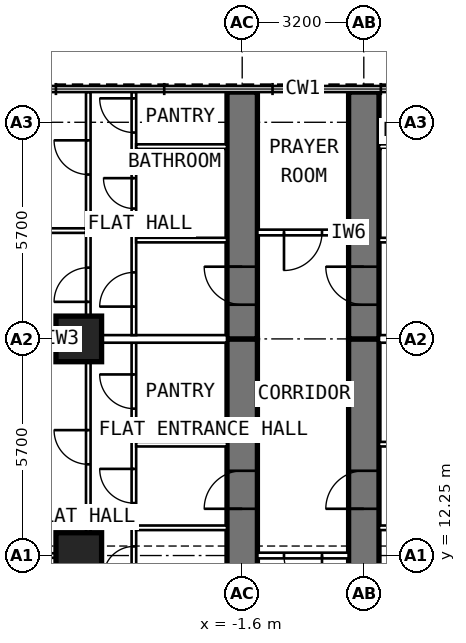
"""IFC4 building model, lengths in metres.
Left out: names, types, materials, properties, quantities, classifications, styles, units other than length and angle.
Written with IfcOpenShell. Run it as: python <this file> out.ifc"""

import sys

from ifc_helpers import new_model, si_unit, direction, frame, frame_2d, origin, origin_2d, place, context, subcontext, project, spatial, rectangle, extrude, element, fill, save


model = new_model("IFC4")
c1 = context("Model", 3, precision=1e-05, world=origin(), true_north=direction((0.0, 1.0)))
c2 = subcontext(c1, "Body", "Model", "MODEL_VIEW")
j1 = project(units=[si_unit("LENGTHUNIT", "METRE"), si_unit("PLANEANGLEUNIT", "RADIAN")], contexts=[c1])
p1 = place(None, origin())
s1 = spatial("IfcSite", under=j1, at=p1, CompositionType="ELEMENT")
p2 = place(p1, origin())
s2 = spatial("IfcBuilding", under=s1, at=p2, CompositionType="ELEMENT")
p3 = place(p2, frame((0.0, 0.0, 176.0)))
s3 = spatial("IfcBuildingStorey", under=s2, at=p3, CompositionType="ELEMENT", Elevation=176.0)
for number, where, z_axis, x_axis in (
    (1, (-5.9, 12.25, 0.0), (0.0, 0.0, 1.0), (0.0, 1.0, 0.0)),
    (2, (-5.9, 17.95, 0.0), (0.0, 0.0, 1.0), (0.0, 1.0, 0.0)),
):
    element("IfcColumn", number, at=place(p3, frame(where, z_axis=z_axis, x_axis=x_axis)), inside=s3, PredefinedType="COLUMN", context=c2, shape_type="SweptSolid", body=[
        extrude(rectangle(XDim=1.2, YDim=1.2, at=origin_2d()), origin(), (0.0, 0.0, 1.0), 3.6),
    ])
p4 = place(p3, frame((-1.6, 9.6, 0.0), z_axis=(0.0, 0.0, 1.0), x_axis=(0.0, 1.0, 0.0)))
e3 = element("IfcWall", 3, at=p4, inside=s3, PredefinedType="SHEAR", context=c2, shape_type="SweptSolid", body=[
    extrude(rectangle(XDim=8.35, YDim=0.8, at=frame_2d((4.175, 0.0))), origin(), (0.0, 0.0, 1.0), 3.6),
])
p5 = place(p4, frame((3.88, 0.0, 0.0)))
e4 = element("IfcOpeningElement", 4, at=p5, cuts=e3, PredefinedType="OPENING", context=c2, shape_type="SweptSolid", body=[
    extrude(rectangle(XDim=1.0, YDim=2.1, at=frame_2d((0.5, 1.05))), frame((0.0, 0.412, 0.0), z_axis=(0.0, -1.0, 0.0), x_axis=(1.0, 0.0, 0.0)), (0.0, 0.0, 1.0), 0.824),
])
p6 = place(p3, frame((-1.6, 17.95, 0.0), z_axis=(0.0, 0.0, 1.0), x_axis=(0.0, 1.0, 0.0)))
e5 = element("IfcWall", 5, at=p6, inside=s3, PredefinedType="SHEAR", context=c2, shape_type="SweptSolid", body=[
    extrude(rectangle(XDim=6.495, YDim=0.8, at=frame_2d((3.248, 0.0))), origin(), (0.0, 0.0, 1.0), 3.6),
])
p7 = place(p6, frame((0.9, 0.0, 0.0)))
e6 = element("IfcOpeningElement", 6, at=p7, cuts=e5, PredefinedType="OPENING", context=c2, shape_type="SweptSolid", body=[
    extrude(rectangle(XDim=1.0, YDim=2.1, at=frame_2d((0.5, 1.05))), frame((0.0, 0.412, 0.0), z_axis=(0.0, -1.0, 0.0), x_axis=(1.0, 0.0, 0.0)), (0.0, 0.0, 1.0), 0.824),
])
p8 = place(p3, frame((1.6, 9.6, 0.0), z_axis=(0.0, 0.0, 1.0), x_axis=(0.0, 1.0, 0.0)))
e7 = element("IfcWall", 7, at=p8, inside=s3, PredefinedType="SHEAR", context=c2, shape_type="SweptSolid", body=[
    extrude(rectangle(XDim=8.35, YDim=0.8, at=frame_2d((4.175, 0.0))), origin(), (0.0, 0.0, 1.0), 3.6),
])
p9 = place(p8, frame((3.88, 0.0, 0.0)))
e8 = element("IfcOpeningElement", 8, at=p9, cuts=e7, PredefinedType="OPENING", context=c2, shape_type="SweptSolid", body=[
    extrude(rectangle(XDim=1.0, YDim=2.1, at=frame_2d((0.5, 1.05))), frame((0.0, 0.412, 0.0), z_axis=(0.0, -1.0, 0.0), x_axis=(1.0, 0.0, 0.0)), (0.0, 0.0, 1.0), 0.824),
])
p10 = place(p3, frame((1.6, 17.95, 0.0), z_axis=(0.0, 0.0, 1.0), x_axis=(0.0, 1.0, 0.0)))
e9 = element("IfcWall", 9, at=p10, inside=s3, PredefinedType="SHEAR", context=c2, shape_type="SweptSolid", body=[
    extrude(rectangle(XDim=6.495, YDim=0.8, at=frame_2d((3.248, 0.0))), origin(), (0.0, 0.0, 1.0), 3.6),
])
p11 = place(p10, frame((0.9, 0.0, 0.0)))
e10 = element("IfcOpeningElement", 10, at=p11, cuts=e9, PredefinedType="OPENING", context=c2, shape_type="SweptSolid", body=[
    extrude(rectangle(XDim=1.0, YDim=2.1, at=frame_2d((0.5, 1.05))), frame((0.0, 0.412, 0.0), z_axis=(0.0, -1.0, 0.0), x_axis=(1.0, 0.0, 0.0)), (0.0, 0.0, 1.0), 0.824),
])
p12 = place(p3, frame((-4.45, 10.05, 0.0), z_axis=(0.0, 0.0, 1.0), x_axis=(0.0, 1.0, 0.0)))
e11 = element("IfcWall", 11, at=p12, inside=s3, PredefinedType="PARTITIONING", context=c2, shape_type="SweptSolid", body=[
    extrude(rectangle(XDim=7.8, YDim=0.12, at=frame_2d((3.9, 0.0))), origin(), (0.0, 0.0, 1.0), 3.35),
])
p13 = place(p12, frame((1.64, 0.0, 0.0)))
e12 = element("IfcOpeningElement", 12, at=p13, cuts=e11, PredefinedType="OPENING", context=c2, shape_type="SweptSolid", body=[
    extrude(rectangle(XDim=0.8, YDim=2.1, at=frame_2d((0.4, 1.05))), frame((0.0, 0.072, 0.0), z_axis=(0.0, -1.0, 0.0), x_axis=(1.0, 0.0, 0.0)), (0.0, 0.0, 1.0), 0.144),
])
p14 = place(p12, frame((3.58, 0.0, 0.0)))
e13 = element("IfcOpeningElement", 13, at=p14, cuts=e11, PredefinedType="OPENING", context=c2, shape_type="SweptSolid", body=[
    extrude(rectangle(XDim=0.9, YDim=2.1, at=frame_2d((0.45, 1.05))), frame((0.0, 0.072, 0.0), z_axis=(0.0, -1.0, 0.0), x_axis=(1.0, 0.0, 0.0)), (0.0, 0.0, 1.0), 0.144),
])
p15 = place(p12, frame((6.065, 0.0, 0.0)))
e14 = element("IfcOpeningElement", 14, at=p15, cuts=e11, PredefinedType="OPENING", context=c2, shape_type="SweptSolid", body=[
    extrude(rectangle(XDim=0.9, YDim=2.1, at=frame_2d((0.45, 1.05))), frame((0.0, 0.072, 0.0), z_axis=(0.0, -1.0, 0.0), x_axis=(1.0, 0.0, 0.0)), (0.0, 0.0, 1.0), 0.144),
])
p16 = place(p3, frame((-5.65, 9.6, 0.0), z_axis=(0.0, 0.0, 1.0), x_axis=(0.0, 1.0, 0.0)))
e15 = element("IfcWall", 15, at=p16, inside=s3, PredefinedType="PARTITIONING", context=c2, shape_type="SweptSolid", body=[
    extrude(rectangle(XDim=8.1, YDim=0.12, at=frame_2d((4.05, 0.0))), origin(), (0.0, 0.0, 1.0), 3.35),
])
p17 = place(p16, frame((5.05, 0.0, 0.0)))
e16 = element("IfcOpeningElement", 16, at=p17, cuts=e15, PredefinedType="OPENING", context=c2, shape_type="SweptSolid", body=[
    extrude(rectangle(XDim=0.9, YDim=2.1, at=frame_2d((0.45, 1.05))), frame((0.0, 0.072, 0.0), z_axis=(0.0, -1.0, 0.0), x_axis=(1.0, 0.0, 0.0)), (0.0, 0.0, 1.0), 0.144),
])
p18 = place(p3, frame((-5.71, 12.25, 0.0), z_axis=(0.0, 0.0, 1.0), x_axis=(-1.0, 0.0, 0.0)))
e17 = element("IfcWall", 17, at=p18, inside=s3, PredefinedType="PARTITIONING", context=c2, shape_type="SweptSolid", body=[
    extrude(rectangle(XDim=4.99, YDim=0.12, at=frame_2d((2.495, 0.0))), origin(), (0.0, 0.0, 1.0), 2.45),
])
p19 = place(p18, frame((1.94, 0.0, 0.0)))
e18 = element("IfcOpeningElement", 18, at=p19, cuts=e17, PredefinedType="OPENING", context=c2, shape_type="SweptSolid", body=[
    extrude(rectangle(XDim=0.9, YDim=2.1, at=frame_2d((0.45, 1.05))), frame((0.0, 0.072, 0.0), z_axis=(0.0, -1.0, 0.0), x_axis=(1.0, 0.0, 0.0)), (0.0, 0.0, 1.0), 0.144),
])
for number, where, z_axis, x_axis in (
    (19, (-2.0, 12.98, 0.0), (0.0, 0.0, 1.0), (-1.0, 0.0, 0.0)),
    (20, (-2.0, 15.18, 0.0), (0.0, 0.0, 1.0), (-1.0, 0.0, 0.0)),
):
    element("IfcWall", number, at=place(p3, frame(where, z_axis=z_axis, x_axis=x_axis)), inside=s3, PredefinedType="PARTITIONING", context=c2, shape_type="SweptSolid", body=[
        extrude(rectangle(XDim=2.39, YDim=0.12, at=frame_2d((1.195, 0.0))), origin(), (0.0, 0.0, 1.0), 3.35),
    ])
p20 = place(p3, frame((-4.45, 18.05, 0.0), z_axis=(0.0, 0.0, 1.0), x_axis=(0.0, 1.0, 0.0)))
e21 = element("IfcWall", 21, at=p20, inside=s3, PredefinedType="PARTITIONING", context=c2, shape_type="SweptSolid", body=[
    extrude(rectangle(XDim=6.395, YDim=0.12, at=frame_2d((3.198, 0.0))), origin(), (0.0, 0.0, 1.0), 3.35),
])
p21 = place(p20, frame((0.75, 0.0, 0.0)))
e22 = element("IfcOpeningElement", 22, at=p21, cuts=e21, PredefinedType="OPENING", context=c2, shape_type="SweptSolid", body=[
    extrude(rectangle(XDim=0.9, YDim=2.1, at=frame_2d((0.45, 1.05))), frame((0.0, 0.072, 0.0), z_axis=(0.0, -1.0, 0.0), x_axis=(1.0, 0.0, 0.0)), (0.0, 0.0, 1.0), 0.144),
])
p22 = place(p20, frame((3.33, 0.0, 0.0)))
e23 = element("IfcOpeningElement", 23, at=p22, cuts=e21, PredefinedType="OPENING", context=c2, shape_type="SweptSolid", body=[
    extrude(rectangle(XDim=0.8, YDim=2.1, at=frame_2d((0.4, 1.05))), frame((0.0, 0.072, 0.0), z_axis=(0.0, -1.0, 0.0), x_axis=(1.0, 0.0, 0.0)), (0.0, 0.0, 1.0), 0.144),
])
p23 = place(p20, frame((5.33, 0.0, 0.0)))
e24 = element("IfcOpeningElement", 24, at=p23, cuts=e21, PredefinedType="OPENING", context=c2, shape_type="SweptSolid", body=[
    extrude(rectangle(XDim=0.9, YDim=2.1, at=frame_2d((0.45, 1.05))), frame((0.0, 0.072, 0.0), z_axis=(0.0, -1.0, 0.0), x_axis=(1.0, 0.0, 0.0)), (0.0, 0.0, 1.0), 0.144),
])
p24 = place(p3, frame((-5.65, 18.05, 0.0), z_axis=(0.0, 0.0, 1.0), x_axis=(0.0, 1.0, 0.0)))
e25 = element("IfcWall", 25, at=p24, inside=s3, PredefinedType="PARTITIONING", context=c2, shape_type="SweptSolid", body=[
    extrude(rectangle(XDim=6.395, YDim=0.12, at=frame_2d((3.198, 0.0))), origin(), (0.0, 0.0, 1.0), 3.35),
])
p25 = place(p24, frame((0.875, 0.0, 0.0)))
e26 = element("IfcOpeningElement", 26, at=p25, cuts=e25, PredefinedType="OPENING", context=c2, shape_type="SweptSolid", body=[
    extrude(rectangle(XDim=0.9, YDim=2.1, at=frame_2d((0.45, 1.05))), frame((0.0, 0.072, 0.0), z_axis=(0.0, -1.0, 0.0), x_axis=(1.0, 0.0, 0.0)), (0.0, 0.0, 1.0), 0.144),
])
p26 = place(p24, frame((4.225, 0.0, 0.0)))
e27 = element("IfcOpeningElement", 27, at=p26, cuts=e25, PredefinedType="OPENING", context=c2, shape_type="SweptSolid", body=[
    extrude(rectangle(XDim=0.9, YDim=2.1, at=frame_2d((0.45, 1.05))), frame((0.0, 0.072, 0.0), z_axis=(0.0, -1.0, 0.0), x_axis=(1.0, 0.0, 0.0)), (0.0, 0.0, 1.0), 0.144),
])
p27 = place(p3, frame((-5.71, 20.8, 0.0), z_axis=(0.0, 0.0, 1.0), x_axis=(-1.0, 0.0, 0.0)))
e28 = element("IfcWall", 28, at=p27, inside=s3, PredefinedType="PARTITIONING", context=c2, shape_type="SweptSolid", body=[
    extrude(rectangle(XDim=4.99, YDim=0.12, at=frame_2d((2.495, 0.0))), origin(), (0.0, 0.0, 1.0), 3.35),
])
for number, where, z_axis, x_axis in (
    (29, (-2.0, 20.55, 0.0), (0.0, 0.0, 1.0), (-1.0, 0.0, 0.0)),
    (30, (-2.0, 23.01, 0.0), (0.0, 0.0, 1.0), (-1.0, 0.0, 0.0)),
):
    element("IfcWall", number, at=place(p3, frame(where, z_axis=z_axis, x_axis=x_axis)), inside=s3, PredefinedType="PARTITIONING", context=c2, shape_type="SweptSolid", body=[
        extrude(rectangle(XDim=2.39, YDim=0.12, at=frame_2d((1.195, 0.0))), origin(), (0.0, 0.0, 1.0), 3.35),
    ])
p28 = place(p3, frame((-2.0, 17.95, 0.0), z_axis=(0.0, 0.0, 1.0), x_axis=(-1.0, 0.0, 0.0)))
e31 = element("IfcWall", 31, at=p28, inside=s3, PredefinedType="PARTITIONING", context=c2, shape_type="SweptSolid", body=[
    extrude(rectangle(XDim=8.7, YDim=0.2, at=frame_2d((4.35, 0.0))), origin(), (0.0, 0.0, 1.0), 2.45),
])
for number, where, z_axis, x_axis in (
    (32, (2.0, 12.98, 0.0), (0.0, 0.0, 1.0), (1.0, 0.0, 0.0)),
    (33, (2.0, 15.18, 0.0), (0.0, 0.0, 1.0), (1.0, 0.0, 0.0)),
    (34, (2.0, 20.55, 0.0), (0.0, 0.0, 1.0), (1.0, 0.0, 0.0)),
    (35, (2.0, 23.01, 0.0), (0.0, 0.0, 1.0), (1.0, 0.0, 0.0)),
):
    element("IfcWall", number, at=place(p3, frame(where, z_axis=z_axis, x_axis=x_axis)), inside=s3, PredefinedType="PARTITIONING", context=c2, shape_type="SweptSolid", body=[
        extrude(rectangle(XDim=2.39, YDim=0.12, at=frame_2d((1.195, 0.0))), origin(), (0.0, 0.0, 1.0), 3.35),
    ])
p29 = place(p3, frame((2.0, 17.95, 0.0), z_axis=(0.0, 0.0, 1.0), x_axis=(1.0, 0.0, 0.0)))
e36 = element("IfcWall", 36, at=p29, inside=s3, PredefinedType="PARTITIONING", context=c2, shape_type="SweptSolid", body=[
    extrude(rectangle(XDim=8.7, YDim=0.2, at=frame_2d((4.35, 0.0))), origin(), (0.0, 0.0, 1.0), 2.45),
])
p30 = place(p3, frame((1.2, 20.75, 0.0), z_axis=(0.0, 0.0, 1.0), x_axis=(-1.0, 0.0, 0.0)))
e37 = element("IfcWall", 37, at=p30, inside=s3, PredefinedType="PARTITIONING", context=c2, shape_type="SweptSolid", body=[
    extrude(rectangle(XDim=2.4, YDim=0.15, at=frame_2d((1.2, 0.0))), origin(), (0.0, 0.0, 1.0), 3.35),
])
p31 = place(p30, frame((0.7, 0.0, 0.0)))
e38 = element("IfcOpeningElement", 38, at=p31, cuts=e37, PredefinedType="OPENING", context=c2, shape_type="SweptSolid", body=[
    extrude(rectangle(XDim=1.0, YDim=2.1, at=frame_2d((0.5, 1.05))), frame((0.0, 0.087, 0.0), z_axis=(0.0, -1.0, 0.0), x_axis=(1.0, 0.0, 0.0)), (0.0, 0.0, 1.0), 0.174),
])
p32 = place(p3, frame((1.2, 12.25, 0.0), z_axis=(0.0, 0.0, 1.0), x_axis=(-1.0, 0.0, 0.0)))
e39 = element("IfcWall", 39, at=p32, inside=s3, PredefinedType="PARTITIONING", context=c2, shape_type="SweptSolid", body=[
    extrude(rectangle(XDim=2.4, YDim=0.15, at=frame_2d((1.2, 0.0))), origin(), (0.0, 0.0, 1.0), 3.35),
])
p33 = place(p32, frame((0.7, 0.0, 0.0)))
e40 = element("IfcOpeningElement", 40, at=p33, cuts=e39, PredefinedType="OPENING", context=c2, shape_type="SweptSolid", body=[
    extrude(rectangle(XDim=1.0, YDim=2.1, at=frame_2d((0.5, 1.05))), frame((0.0, 0.087, 0.0), z_axis=(0.0, -1.0, 0.0), x_axis=(1.0, 0.0, 0.0)), (0.0, 0.0, 1.0), 0.174),
])
p34 = place(p5, origin())
e41 = element("IfcDoor", 41, at=p34, inside=s3, OperationType="SINGLE_SWING_LEFT", PredefinedType="DOOR", context=c2, shape_type="SweptSolid", body=[
    extrude(rectangle(XDim=1.0, YDim=2.1, at=frame_2d((0.5, 1.05))), frame((0.0, 0.15, 0.0), z_axis=(0.0, -1.0, 0.0), x_axis=(1.0, 0.0, 0.0)), (0.0, 0.0, 1.0), 0.3),
])
fill(e4, e41)
p35 = place(p17, origin())
e42 = element("IfcDoor", 42, at=p35, inside=s3, OperationType="SINGLE_SWING_RIGHT", PredefinedType="DOOR", context=c2, shape_type="SweptSolid", body=[
    extrude(rectangle(XDim=0.9, YDim=2.1, at=frame_2d((0.45, 1.05))), frame((0.0, 0.025, 0.0), z_axis=(0.0, -1.0, 0.0), x_axis=(1.0, 0.0, 0.0)), (0.0, 0.0, 1.0), 0.05),
])
fill(e16, e42)
p36 = place(p13, origin())
e43 = element("IfcDoor", 43, at=p36, inside=s3, OperationType="SINGLE_SWING_LEFT", PredefinedType="DOOR", context=c2, shape_type="SweptSolid", body=[
    extrude(rectangle(XDim=0.8, YDim=2.1, at=frame_2d((0.4, 1.05))), frame((0.0, 0.025, 0.0), z_axis=(0.0, -1.0, 0.0), x_axis=(1.0, 0.0, 0.0)), (0.0, 0.0, 1.0), 0.05),
])
fill(e12, e43)
p37 = place(p14, origin())
e44 = element("IfcDoor", 44, at=p37, inside=s3, OperationType="SINGLE_SWING_RIGHT", PredefinedType="DOOR", context=c2, shape_type="SweptSolid", body=[
    extrude(rectangle(XDim=0.9, YDim=2.1, at=frame_2d((0.45, 1.05))), frame((0.0, 0.025, 0.0), z_axis=(0.0, -1.0, 0.0), x_axis=(1.0, 0.0, 0.0)), (0.0, 0.0, 1.0), 0.05),
])
fill(e13, e44)
p38 = place(p15, origin())
e45 = element("IfcDoor", 45, at=p38, inside=s3, OperationType="SINGLE_SWING_RIGHT", PredefinedType="DOOR", context=c2, shape_type="SweptSolid", body=[
    extrude(rectangle(XDim=0.9, YDim=2.1, at=frame_2d((0.45, 1.05))), frame((0.0, 0.025, 0.0), z_axis=(0.0, -1.0, 0.0), x_axis=(1.0, 0.0, 0.0)), (0.0, 0.0, 1.0), 0.05),
])
fill(e14, e45)
p39 = place(p7, origin())
e46 = element("IfcDoor", 46, at=p39, inside=s3, OperationType="SINGLE_SWING_RIGHT", PredefinedType="DOOR", context=c2, shape_type="SweptSolid", body=[
    extrude(rectangle(XDim=1.0, YDim=2.1, at=frame_2d((0.5, 1.05))), frame((0.0, 0.15, 0.0), z_axis=(0.0, -1.0, 0.0), x_axis=(1.0, 0.0, 0.0)), (0.0, 0.0, 1.0), 0.3),
])
fill(e6, e46)
p40 = place(p25, origin())
e47 = element("IfcDoor", 47, at=p40, inside=s3, OperationType="SINGLE_SWING_LEFT", PredefinedType="DOOR", context=c2, shape_type="SweptSolid", body=[
    extrude(rectangle(XDim=0.9, YDim=2.1, at=frame_2d((0.45, 1.05))), frame((0.0, 0.025, 0.0), z_axis=(0.0, -1.0, 0.0), x_axis=(1.0, 0.0, 0.0)), (0.0, 0.0, 1.0), 0.05),
])
fill(e26, e47)
p41 = place(p26, origin())
e48 = element("IfcDoor", 48, at=p41, inside=s3, OperationType="SINGLE_SWING_RIGHT", PredefinedType="DOOR", context=c2, shape_type="SweptSolid", body=[
    extrude(rectangle(XDim=0.9, YDim=2.1, at=frame_2d((0.45, 1.05))), frame((0.0, 0.025, 0.0), z_axis=(0.0, -1.0, 0.0), x_axis=(1.0, 0.0, 0.0)), (0.0, 0.0, 1.0), 0.05),
])
fill(e27, e48)
p42 = place(p21, origin())
e49 = element("IfcDoor", 49, at=p42, inside=s3, OperationType="SINGLE_SWING_LEFT", PredefinedType="DOOR", context=c2, shape_type="SweptSolid", body=[
    extrude(rectangle(XDim=0.9, YDim=2.1, at=frame_2d((0.45, 1.05))), frame((0.0, 0.025, 0.0), z_axis=(0.0, -1.0, 0.0), x_axis=(1.0, 0.0, 0.0)), (0.0, 0.0, 1.0), 0.05),
])
fill(e22, e49)
p43 = place(p22, origin())
e50 = element("IfcDoor", 50, at=p43, inside=s3, OperationType="SINGLE_SWING_RIGHT", PredefinedType="DOOR", context=c2, shape_type="SweptSolid", body=[
    extrude(rectangle(XDim=0.8, YDim=2.1, at=frame_2d((0.4, 1.05))), frame((0.0, 0.025, 0.0), z_axis=(0.0, -1.0, 0.0), x_axis=(1.0, 0.0, 0.0)), (0.0, 0.0, 1.0), 0.05),
])
fill(e23, e50)
p44 = place(p23, origin())
e51 = element("IfcDoor", 51, at=p44, inside=s3, OperationType="SINGLE_SWING_RIGHT", PredefinedType="DOOR", context=c2, shape_type="SweptSolid", body=[
    extrude(rectangle(XDim=0.9, YDim=2.1, at=frame_2d((0.45, 1.05))), frame((0.0, 0.025, 0.0), z_axis=(0.0, -1.0, 0.0), x_axis=(1.0, 0.0, 0.0)), (0.0, 0.0, 1.0), 0.05),
])
fill(e24, e51)
p45 = place(p9, origin())
e52 = element("IfcDoor", 52, at=p45, inside=s3, OperationType="SINGLE_SWING_LEFT", PredefinedType="DOOR", context=c2, shape_type="SweptSolid", body=[
    extrude(rectangle(XDim=1.0, YDim=2.1, at=frame_2d((0.5, 1.05))), frame((0.0, 0.15, 0.0), z_axis=(0.0, -1.0, 0.0), x_axis=(1.0, 0.0, 0.0)), (0.0, 0.0, 1.0), 0.3),
])
fill(e8, e52)
p46 = place(p11, origin())
e53 = element("IfcDoor", 53, at=p46, inside=s3, OperationType="SINGLE_SWING_RIGHT", PredefinedType="DOOR", context=c2, shape_type="SweptSolid", body=[
    extrude(rectangle(XDim=1.0, YDim=2.1, at=frame_2d((0.5, 1.05))), frame((0.0, 0.15, 0.0), z_axis=(0.0, -1.0, 0.0), x_axis=(1.0, 0.0, 0.0)), (0.0, 0.0, 1.0), 0.3),
])
fill(e10, e53)
p47 = place(p31, origin())
e54 = element("IfcDoor", 54, at=p47, inside=s3, OperationType="SINGLE_SWING_RIGHT", PredefinedType="DOOR", context=c2, shape_type="SweptSolid", body=[
    extrude(rectangle(XDim=1.0, YDim=2.1, at=frame_2d((0.5, 1.05))), frame((0.0, 0.025, 0.0), z_axis=(0.0, -1.0, 0.0), x_axis=(1.0, 0.0, 0.0)), (0.0, 0.0, 1.0), 0.05),
])
fill(e38, e54)
p48 = place(p33, origin())
e55 = element("IfcDoor", 55, at=p48, inside=s3, OperationType="SINGLE_SWING_LEFT", PredefinedType="DOOR", context=c2, shape_type="SweptSolid", body=[
    extrude(rectangle(XDim=1.0, YDim=2.1, at=frame_2d((0.5, 1.05))), frame((0.0, 0.025, 0.0), z_axis=(0.0, -1.0, 0.0), x_axis=(1.0, 0.0, 0.0)), (0.0, 0.0, 1.0), 0.05),
])
fill(e40, e55)
save(model, sys.argv[1])
